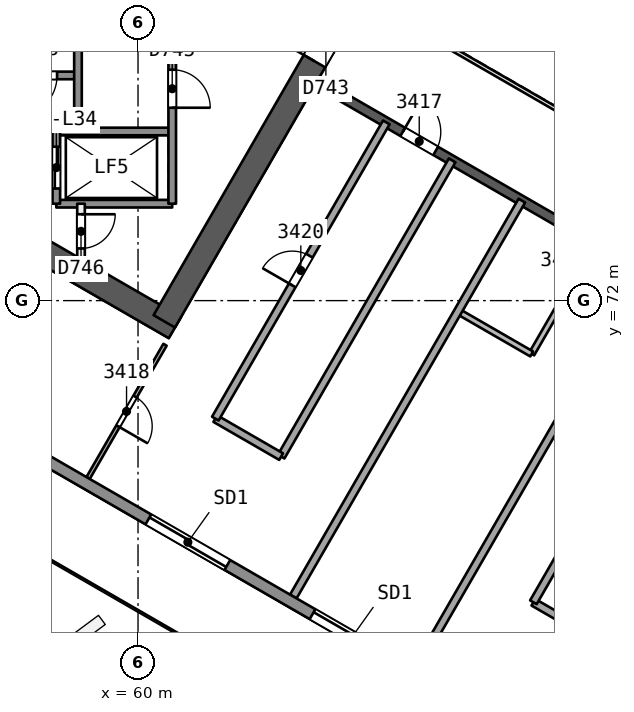
"""IFC4 building model, lengths in metres.
Left out: names, types, materials, properties, quantities, classifications, styles, units other than length and angle.
Written with IfcOpenShell. Run it as: python <this file> out.ifc"""

import sys

from ifc_helpers import new_model, si_unit, direction, frame, frame_2d, origin, place, context, subcontext, project, spatial, rectangle, extrude, element, fill, save


model = new_model("IFC4")
c1 = context("Model", 3, precision=1e-05, world=origin(), true_north=direction((0.0, 1.0)))
c2 = subcontext(c1, "Body", "Model", "MODEL_VIEW")
j1 = project(units=[si_unit("LENGTHUNIT", "METRE"), si_unit("PLANEANGLEUNIT", "RADIAN")], contexts=[c1])
p1 = place(None, origin())
s1 = spatial("IfcSite", under=j1, at=p1, CompositionType="ELEMENT")
p2 = place(p1, origin())
s2 = spatial("IfcBuilding", under=s1, at=p2, CompositionType="ELEMENT")
p3 = place(p2, frame((0.0, 0.0, 140.1)))
s3 = spatial("IfcBuildingStorey", under=s2, at=p3, CompositionType="ELEMENT", Elevation=140.1)
p4 = place(p3, frame((48.722, 78.365, 0.0), z_axis=(0.0, 0.0, 1.0), x_axis=(0.866020036431, -0.500009296414, 0.0)))
e1 = element("IfcWall", 1, at=p4, inside=s3, PredefinedType="SHEAR", context=c2, shape_type="SweptSolid", body=[
    extrude(rectangle(XDim=14.146, YDim=0.65, at=frame_2d((7.073, 0.0))), origin(), (0.0, 0.0, 1.0), 3.7),
])
p5 = place(p3, frame((60.691, 71.455, 0.0), z_axis=(0.0, 0.0, 1.0), x_axis=(0.499983075189, 0.866035175108, 0.0)))
e2 = element("IfcWall", 2, at=p5, inside=s3, PredefinedType="SHEAR", context=c2, shape_type="SweptSolid", body=[
    extrude(rectangle(XDim=10.055, YDim=0.65, at=frame_2d((5.027, 0.0))), origin(), (0.0, 0.0, 1.0), 3.7),
])
p6 = place(p5, frame((7.905, 0.0, 0.0)))
e3 = element("IfcOpeningElement", 3, at=p6, cuts=e2, PredefinedType="OPENING", context=c2, shape_type="SweptSolid", body=[
    extrude(rectangle(XDim=1.2, YDim=2.1, at=frame_2d((0.6, 1.05))), frame((0.0, 0.335, 0.0), z_axis=(0.0, -1.0, 0.0), x_axis=(1.0, 0.0, 0.0)), (0.0, 0.0, 1.0), 0.671),
])
p7 = place(p3, frame((64.7, 77.748, 0.0), z_axis=(0.0, 0.0, 1.0), x_axis=(0.866026492143, -0.499998114903, 0.0)))
e4 = element("IfcWall", 4, at=p7, inside=s3, PredefinedType="SHEAR", context=c2, shape_type="SweptSolid", body=[
    extrude(rectangle(XDim=15.588, YDim=0.25, at=frame_2d((7.794, 0.0))), origin(), (0.0, 0.0, 1.0), 3.25),
])
p8 = place(p7, frame((2.618, 0.0, 0.0)))
e5 = element("IfcOpeningElement", 5, at=p8, cuts=e4, PredefinedType="OPENING", context=c2, shape_type="SweptSolid", body=[
    extrude(rectangle(XDim=1.0, YDim=2.1, at=frame_2d((0.5, 1.05))), frame((0.0, 0.135, 0.0), z_axis=(0.0, -1.0, 0.0), x_axis=(1.0, 0.0, 0.0)), (0.0, 0.0, 1.0), 0.271),
])
p9 = place(p7, frame((8.727, 0.0, 0.0)))
e6 = element("IfcOpeningElement", 6, at=p9, cuts=e4, PredefinedType="OPENING", context=c2, shape_type="SweptSolid", body=[
    extrude(rectangle(XDim=1.0, YDim=2.1, at=frame_2d((0.5, 1.05))), frame((0.0, 0.135, 0.0), z_axis=(0.0, -1.0, 0.0), x_axis=(1.0, 0.0, 0.0)), (0.0, 0.0, 1.0), 0.271),
])
p10 = place(p7, frame((12.282, 0.0, 0.0)))
e7 = element("IfcOpeningElement", 7, at=p10, cuts=e4, PredefinedType="OPENING", context=c2, shape_type="SweptSolid", body=[
    extrude(rectangle(XDim=1.0, YDim=2.1, at=frame_2d((0.5, 1.05))), frame((0.0, 0.135, 0.0), z_axis=(0.0, -1.0, 0.0), x_axis=(1.0, 0.0, 0.0)), (0.0, 0.0, 1.0), 0.271),
])
p11 = place(p3, frame((60.71, 70.838, 0.0), z_axis=(0.0, 0.0, 1.0), x_axis=(-0.499997320042, -0.866026951053, 0.0)))
e8 = element("IfcWall", 8, at=p11, inside=s3, PredefinedType="PARTITIONING", context=c2, shape_type="SweptSolid", body=[
    extrude(rectangle(XDim=4.049, YDim=0.1, at=frame_2d((2.025, 0.0))), origin(), (0.0, 0.0, 1.0), 3.25),
])
p12 = place(p11, frame((1.575, 0.0, 0.0)))
e9 = element("IfcOpeningElement", 9, at=p12, cuts=e8, PredefinedType="OPENING", context=c2, shape_type="SweptSolid", body=[
    extrude(rectangle(XDim=0.9, YDim=2.1, at=frame_2d((0.45, 1.05))), frame((0.0, 0.061, 0.0), z_axis=(0.0, -1.0, 0.0), x_axis=(1.0, 0.0, 0.0)), (0.0, 0.0, 1.0), 0.121),
])
p13 = place(p3, frame((68.266, 75.689, 0.0), z_axis=(0.0, 0.0, 1.0), x_axis=(-0.5000018851, -0.866024315419, 0.0)))
e10 = element("IfcWall", 10, at=p13, inside=s3, PredefinedType="PARTITIONING", context=c2, shape_type="SweptSolid", body=[
    extrude(rectangle(XDim=9.0, YDim=0.2, at=frame_2d((4.5, 0.0))), origin(), (0.0, 0.0, 1.0), 3.25),
])
p14 = place(p3, frame((63.766, 67.895, 0.0), z_axis=(0.0, 0.0, 1.0), x_axis=(-0.866041268327, 0.499972520799, 0.0)))
e11 = element("IfcWall", 11, at=p14, inside=s3, PredefinedType="PARTITIONING", context=c2, shape_type="SweptSolid", body=[
    extrude(rectangle(XDim=2.0, YDim=0.2, at=frame_2d((1.0, 0.0))), origin(), (0.0, 0.0, 1.0), 3.25),
])
p15 = place(p3, frame((62.034, 68.895, 0.0), z_axis=(0.0, 0.0, 1.0), x_axis=(0.5000018851, 0.866024315419, 0.0)))
e12 = element("IfcWall", 12, at=p15, inside=s3, PredefinedType="PARTITIONING", context=c2, shape_type="SweptSolid", body=[
    extrude(rectangle(XDim=9.0, YDim=0.2, at=frame_2d((4.5, 0.0))), origin(), (0.0, 0.0, 1.0), 3.25),
])
p16 = place(p15, frame((4.05, 0.0, 0.0)))
e13 = element("IfcOpeningElement", 13, at=p16, cuts=e12, PredefinedType="OPENING", context=c2, shape_type="SweptSolid", body=[
    extrude(rectangle(XDim=0.9, YDim=2.1, at=frame_2d((0.45, 1.05))), frame((0.0, 0.11, 0.0), z_axis=(0.0, -1.0, 0.0), x_axis=(1.0, 0.0, 0.0)), (0.0, 0.0, 1.0), 0.221),
])
p17 = place(p3, frame((64.086, 64.214, 0.0), z_axis=(0.0, 0.0, 1.0), x_axis=(0.500002984678, 0.866023680573, 0.0)))
e14 = element("IfcWall", 14, at=p17, inside=s3, PredefinedType="PARTITIONING", context=c2, shape_type="SweptSolid", body=[
    extrude(rectangle(XDim=12.028, YDim=0.2, at=frame_2d((6.014, 0.0))), origin(), (0.0, 0.0, 1.0), 3.25),
])
p18 = place(p3, frame((72.041, 73.51, 0.0), z_axis=(0.0, 0.0, 1.0), x_axis=(-0.499994660107, -0.866028486751, 0.0)))
e15 = element("IfcWall", 15, at=p18, inside=s3, PredefinedType="PARTITIONING", context=c2, shape_type="SweptSolid", body=[
    extrude(rectangle(XDim=3.364, YDim=0.15, at=frame_2d((1.682, 0.0))), origin(), (0.0, 0.0, 1.0), 3.25),
])
p19 = place(p18, frame((1.282, 0.0, 0.0)))
e16 = element("IfcOpeningElement", 16, at=p19, cuts=e15, PredefinedType="OPENING", context=c2, shape_type="SweptSolid", body=[
    extrude(rectangle(XDim=0.8, YDim=2.1, at=frame_2d((0.4, 1.05))), frame((0.0, 0.085, 0.0), z_axis=(0.0, -1.0, 0.0), x_axis=(1.0, 0.0, 0.0)), (0.0, 0.0, 1.0), 0.171),
])
p20 = place(p3, frame((70.359, 70.596, 0.0), z_axis=(0.0, 0.0, 1.0), x_axis=(-0.866022320763, 0.500005339912, 0.0)))
e17 = element("IfcWall", 17, at=p20, inside=s3, PredefinedType="PARTITIONING", context=c2, shape_type="SweptSolid", body=[
    extrude(rectangle(XDim=2.241, YDim=0.15, at=frame_2d((1.121, 0.0))), origin(), (0.0, 0.0, 1.0), 3.25),
])
p21 = place(p3, frame((67.326, 62.343, 0.0), z_axis=(0.0, 0.0, 1.0), x_axis=(0.500002984678, 0.866023680573, 0.0)))
e18 = element("IfcWall", 18, at=p21, inside=s3, PredefinedType="PARTITIONING", context=c2, shape_type="SweptSolid", body=[
    extrude(rectangle(XDim=12.028, YDim=0.2, at=frame_2d((6.014, 0.0))), origin(), (0.0, 0.0, 1.0), 3.25),
])
p22 = place(p3, frame((72.136, 63.063, 0.0), z_axis=(0.0, 0.0, 1.0), x_axis=(-0.866010750942, 0.50002537861, 0.0)))
e19 = element("IfcWall", 19, at=p22, inside=s3, PredefinedType="PARTITIONING", context=c2, shape_type="SweptSolid", body=[
    extrude(rectangle(XDim=2.0, YDim=0.2, at=frame_2d((1.0, 0.0))), origin(), (0.0, 0.0, 1.0), 3.25),
])
p23 = place(p3, frame((70.404, 64.063, 0.0), z_axis=(0.0, 0.0, 1.0), x_axis=(0.499990139034, 0.866031096941, 0.0)))
e20 = element("IfcWall", 20, at=p23, inside=s3, PredefinedType="PARTITIONING", context=c2, shape_type="SweptSolid", body=[
    extrude(rectangle(XDim=9.0, YDim=0.2, at=frame_2d((4.5, 0.0))), origin(), (0.0, 0.0, 1.0), 3.25),
])
p24 = place(p23, frame((4.05, 0.0, 0.0)))
e21 = element("IfcOpeningElement", 21, at=p24, cuts=e20, PredefinedType="OPENING", context=c2, shape_type="SweptSolid", body=[
    extrude(rectangle(XDim=0.9, YDim=2.1, at=frame_2d((0.45, 1.05))), frame((0.0, 0.11, 0.0), z_axis=(0.0, -1.0, 0.0), x_axis=(1.0, 0.0, 0.0)), (0.0, 0.0, 1.0), 0.221),
])
p25 = place(p3, frame((89.365, 49.447, 0.0), z_axis=(0.0, 0.0, 1.0), x_axis=(-0.866024602029, 0.500001388679, 0.0)))
e22 = element("IfcWall", 22, at=p25, inside=s3, PredefinedType="SOLIDWALL", context=c2, shape_type="SweptSolid", body=[
    extrude(rectangle(XDim=55.434, YDim=0.3, at=frame_2d((27.717, 0.0))), origin(), (0.0, 0.0, 1.0), 3.25),
])
p26 = place(p25, frame((31.194, 0.0, 0.0)))
e23 = element("IfcOpeningElement", 23, at=p26, cuts=e22, PredefinedType="OPENING", context=c2, shape_type="SweptSolid", body=[
    extrude(rectangle(XDim=2.4, YDim=2.4, at=frame_2d((1.2, 1.2))), frame((0.0, 0.161, 0.0), z_axis=(0.0, -1.0, 0.0), x_axis=(1.0, 0.0, 0.0)), (0.0, 0.0, 1.0), 0.321),
])
p27 = place(p25, frame((43.056, 0.0, 0.0)))
e24 = element("IfcOpeningElement", 24, at=p27, cuts=e22, PredefinedType="OPENING", context=c2, shape_type="SweptSolid", body=[
    extrude(rectangle(XDim=2.4, YDim=2.4, at=frame_2d((1.2, 1.2))), frame((0.0, 0.161, 0.0), z_axis=(0.0, -1.0, 0.0), x_axis=(1.0, 0.0, 0.0)), (0.0, 0.0, 1.0), 0.321),
])
p28 = place(p25, frame((21.529, 0.0, 0.0)))
e25 = element("IfcOpeningElement", 25, at=p28, cuts=e22, PredefinedType="OPENING", context=c2, shape_type="SweptSolid", body=[
    extrude(rectangle(XDim=2.4, YDim=2.4, at=frame_2d((1.2, 1.2))), frame((0.0, 0.161, 0.0), z_axis=(0.0, -1.0, 0.0), x_axis=(1.0, 0.0, 0.0)), (0.0, 0.0, 1.0), 0.321),
])
p29 = place(p25, frame((10.014, 0.0, 0.0)))
e26 = element("IfcOpeningElement", 26, at=p29, cuts=e22, PredefinedType="OPENING", context=c2, shape_type="SweptSolid", body=[
    extrude(rectangle(XDim=2.4, YDim=2.4, at=frame_2d((1.2, 1.2))), frame((0.0, 0.161, 0.0), z_axis=(0.0, -1.0, 0.0), x_axis=(1.0, 0.0, 0.0)), (0.0, 0.0, 1.0), 0.321),
])
p30 = place(p25, frame((26.205, 0.0, 0.0)))
e27 = element("IfcOpeningElement", 27, at=p30, cuts=e22, PredefinedType="OPENING", context=c2, shape_type="SweptSolid", body=[
    extrude(rectangle(XDim=2.4, YDim=2.4, at=frame_2d((1.2, 1.2))), frame((0.0, 0.161, 0.0), z_axis=(0.0, -1.0, 0.0), x_axis=(1.0, 0.0, 0.0)), (0.0, 0.0, 1.0), 0.321),
])
p31 = place(p3, frame((58.42, 77.925, 0.0), z_axis=(0.0, 0.0, 1.0), x_axis=(-1.0, 0.0, 0.0)))
e28 = element("IfcWall", 28, at=p31, inside=s3, PredefinedType="SOLIDWALL", context=c2, shape_type="SweptSolid", body=[
    extrude(rectangle(XDim=7.7, YDim=0.2, at=frame_2d((3.85, 0.0))), origin(), (0.0, 0.0, 1.0), 3.25),
])
p32 = place(p31, frame((0.55, 0.0, 0.0)))
e29 = element("IfcOpeningElement", 29, at=p32, cuts=e28, PredefinedType="OPENING", context=c2, shape_type="SweptSolid", body=[
    extrude(rectangle(XDim=1.1, YDim=2.1, at=frame_2d((0.55, 1.05))), frame((0.0, 0.11, 0.0), z_axis=(0.0, -1.0, 0.0), x_axis=(1.0, 0.0, 0.0)), (0.0, 0.0, 1.0), 0.221),
])
for number, where, z_axis, x_axis in (
    (30, (60.9, 76.45, 0.0), (0.0, 0.0, 1.0), (-1.0, 0.0, 0.0)),
    (31, (60.9, 74.55, 0.0), (0.0, 0.0, 1.0), (-1.0, 0.0, 0.0)),
):
    element("IfcWall", number, at=place(p3, frame(where, z_axis=z_axis, x_axis=x_axis)), inside=s3, PredefinedType="SOLIDWALL", context=c2, shape_type="SweptSolid", body=[
        extrude(rectangle(XDim=3.05, YDim=0.2, at=frame_2d((1.525, 0.0))), origin(), (0.0, 0.0, 1.0), 3.25),
    ])
p33 = place(p3, frame((60.9, 85.45, 0.0), z_axis=(0.0, 0.0, 1.0), x_axis=(0.0, -1.0, 0.0)))
e32 = element("IfcWall", 32, at=p33, inside=s3, PredefinedType="SOLIDWALL", context=c2, shape_type="SweptSolid", body=[
    extrude(rectangle(XDim=10.9, YDim=0.2, at=frame_2d((5.45, 0.0))), origin(), (0.0, 0.0, 1.0), 3.25),
])
p34 = place(p33, frame((2.875, 0.0, 0.0)))
e33 = element("IfcOpeningElement", 33, at=p34, cuts=e32, PredefinedType="OPENING", context=c2, shape_type="SweptSolid", body=[
    extrude(rectangle(XDim=1.0, YDim=2.1, at=frame_2d((0.5, 1.05))), frame((0.0, 0.11, 0.0), z_axis=(0.0, -1.0, 0.0), x_axis=(1.0, 0.0, 0.0)), (0.0, 0.0, 1.0), 0.221),
])
p35 = place(p33, frame((7.375, 0.0, 0.0)))
e34 = element("IfcOpeningElement", 34, at=p35, cuts=e32, PredefinedType="OPENING", context=c2, shape_type="SweptSolid", body=[
    extrude(rectangle(XDim=1.0, YDim=2.1, at=frame_2d((0.5, 1.05))), frame((0.0, 0.11, 0.0), z_axis=(0.0, -1.0, 0.0), x_axis=(1.0, 0.0, 0.0)), (0.0, 0.0, 1.0), 0.221),
])
p36 = place(p3, frame((58.5, 74.55, 0.0), z_axis=(0.0, 0.0, 1.0), x_axis=(0.0, -1.0, 0.0)))
e35 = element("IfcWall", 35, at=p36, inside=s3, PredefinedType="PARTITIONING", context=c2, shape_type="SweptSolid", body=[
    extrude(rectangle(XDim=1.455, YDim=0.2, at=frame_2d((0.728, 0.0))), origin(), (0.0, 0.0, 1.0), 3.25),
])
p37 = place(p36, frame((0.278, 0.0, 0.0)))
e36 = element("IfcOpeningElement", 36, at=p37, cuts=e35, PredefinedType="OPENING", context=c2, shape_type="SweptSolid", body=[
    extrude(rectangle(XDim=0.9, YDim=2.1, at=frame_2d((0.45, 1.05))), frame((0.0, 0.11, 0.0), z_axis=(0.0, -1.0, 0.0), x_axis=(1.0, 0.0, 0.0)), (0.0, 0.0, 1.0), 0.221),
])
p38 = place(p3, frame((58.42, 85.45, 0.0), z_axis=(0.0, 0.0, 1.0), x_axis=(0.0, -1.0, 0.0)))
e37 = element("IfcWall", 37, at=p38, inside=s3, PredefinedType="SOLIDWALL", context=c2, shape_type="SweptSolid", body=[
    extrude(rectangle(XDim=9.0, YDim=0.2, at=frame_2d((4.5, 0.0))), origin(), (0.0, 0.0, 1.0), 3.25),
])
p39 = place(p3, frame((57.85, 76.45, 0.0), z_axis=(0.0, 0.0, 1.0), x_axis=(0.0, -1.0, 0.0)))
e38 = element("IfcWall", 38, at=p39, inside=s3, PredefinedType="SOLIDWALL", context=c2, shape_type="SweptSolid", body=[
    extrude(rectangle(XDim=1.9, YDim=0.2, at=frame_2d((0.95, 0.0))), origin(), (0.0, 0.0, 1.0), 3.25),
])
p40 = place(p39, frame((0.4, 0.0, 0.0)))
e39 = element("IfcOpeningElement", 39, at=p40, cuts=e38, PredefinedType="OPENING", context=c2, shape_type="SweptSolid", body=[
    extrude(rectangle(XDim=1.1, YDim=2.1, at=frame_2d((0.55, 1.05))), frame((0.0, 0.11, 0.0), z_axis=(0.0, -1.0, 0.0), x_axis=(1.0, 0.0, 0.0)), (0.0, 0.0, 1.0), 0.221),
])
p41 = place(p3, frame((67.702, 78.948, 0.0), z_axis=(0.0, 0.0, 1.0), x_axis=(0.866026658274, -0.499997827154, 0.0)))
e40 = element("IfcWall", 40, at=p41, inside=s3, PredefinedType="PARTITIONING", context=c2, shape_type="SweptSolid", body=[
    extrude(rectangle(XDim=11.588, YDim=0.1, at=frame_2d((5.794, 0.0))), origin(), (0.0, 0.0, 1.0), 3.25),
])
p42 = place(p8, origin())
e41 = element("IfcDoor", 41, at=p42, inside=s3, OperationType="SINGLE_SWING_LEFT", PredefinedType="NOTDEFINED", context=c2, shape_type="SweptSolid", body=[
    extrude(rectangle(XDim=1.0, YDim=2.1, at=frame_2d((0.5, 1.05))), frame((0.0, 0.025, 0.0), z_axis=(0.0, -1.0, 0.0), x_axis=(1.0, 0.0, 0.0)), (0.0, 0.0, 1.0), 0.05),
])
fill(e5, e41)
p43 = place(p12, origin())
e42 = element("IfcDoor", 42, at=p43, inside=s3, OperationType="SINGLE_SWING_RIGHT", PredefinedType="NOTDEFINED", context=c2, shape_type="SweptSolid", body=[
    extrude(rectangle(XDim=0.9, YDim=2.1, at=frame_2d((0.45, 1.05))), frame((0.0, 0.025, 0.0), z_axis=(0.0, -1.0, 0.0), x_axis=(1.0, 0.0, 0.0)), (0.0, 0.0, 1.0), 0.05),
])
fill(e9, e42)
p44 = place(p16, origin())
e43 = element("IfcDoor", 43, at=p44, inside=s3, OperationType="SINGLE_SWING_LEFT", PredefinedType="NOTDEFINED", context=c2, shape_type="SweptSolid", body=[
    extrude(rectangle(XDim=0.9, YDim=2.1, at=frame_2d((0.45, 1.05))), frame((0.0, 0.025, 0.0), z_axis=(0.0, -1.0, 0.0), x_axis=(1.0, 0.0, 0.0)), (0.0, 0.0, 1.0), 0.05),
])
fill(e13, e43)
p45 = place(p26, origin())
e44 = element("IfcDoor", 44, at=p45, inside=s3, OperationType="SLIDING_TO_LEFT", PredefinedType="NOTDEFINED", context=c2, shape_type="SweptSolid", body=[
    extrude(rectangle(XDim=2.4, YDim=2.4, at=frame_2d((1.2, 1.2))), frame((0.0, 0.025, 0.0), z_axis=(0.0, -1.0, 0.0), x_axis=(1.0, 0.0, 0.0)), (0.0, 0.0, 1.0), 0.05),
])
fill(e23, e44)
p46 = place(p30, origin())
e45 = element("IfcDoor", 45, at=p46, inside=s3, OperationType="SLIDING_TO_LEFT", PredefinedType="NOTDEFINED", context=c2, shape_type="SweptSolid", body=[
    extrude(rectangle(XDim=2.4, YDim=2.4, at=frame_2d((1.2, 1.2))), frame((0.0, 0.025, 0.0), z_axis=(0.0, -1.0, 0.0), x_axis=(1.0, 0.0, 0.0)), (0.0, 0.0, 1.0), 0.05),
])
fill(e27, e45)
p47 = place(p6, origin())
e46 = element("IfcDoor", 46, at=p47, inside=s3, OperationType="SINGLE_SWING_LEFT", PredefinedType="NOTDEFINED", context=c2, shape_type="SweptSolid", body=[
    extrude(rectangle(XDim=1.2, YDim=2.1, at=frame_2d((0.6, 1.05))), frame((0.0, 0.025, 0.0), z_axis=(0.0, -1.0, 0.0), x_axis=(1.0, 0.0, 0.0)), (0.0, 0.0, 1.0), 0.05),
])
fill(e3, e46)
p48 = place(p40, origin())
e47 = element("IfcDoor", 47, at=p48, inside=s3, OperationType="SLIDING_TO_RIGHT", PredefinedType="NOTDEFINED", context=c2, shape_type="SweptSolid", body=[
    extrude(rectangle(XDim=1.1, YDim=2.1, at=frame_2d((0.55, 1.05))), frame((0.0, 0.025, 0.0), z_axis=(0.0, -1.0, 0.0), x_axis=(1.0, 0.0, 0.0)), (0.0, 0.0, 1.0), 0.05),
])
fill(e39, e47)
p49 = place(p35, origin())
e48 = element("IfcDoor", 48, at=p49, inside=s3, OperationType="SINGLE_SWING_RIGHT", PredefinedType="NOTDEFINED", context=c2, shape_type="SweptSolid", body=[
    extrude(rectangle(XDim=1.0, YDim=2.1, at=frame_2d((0.5, 1.05))), frame((0.0, 0.025, 0.0), z_axis=(0.0, -1.0, 0.0), x_axis=(1.0, 0.0, 0.0)), (0.0, 0.0, 1.0), 0.05),
])
fill(e34, e48)
p50 = place(p37, origin())
e49 = element("IfcDoor", 49, at=p50, inside=s3, OperationType="SINGLE_SWING_LEFT", PredefinedType="NOTDEFINED", context=c2, shape_type="SweptSolid", body=[
    extrude(rectangle(XDim=0.9, YDim=2.1, at=frame_2d((0.45, 1.05))), frame((0.0, 0.025, 0.0), z_axis=(0.0, -1.0, 0.0), x_axis=(1.0, 0.0, 0.0)), (0.0, 0.0, 1.0), 0.05),
])
fill(e36, e49)
p51 = place(p32, origin())
e50 = element("IfcDoor", 50, at=p51, inside=s3, OperationType="SINGLE_SWING_RIGHT", PredefinedType="NOTDEFINED", context=c2, shape_type="SweptSolid", body=[
    extrude(rectangle(XDim=1.1, YDim=2.1, at=frame_2d((0.55, 1.05))), frame((0.0, 0.025, 0.0), z_axis=(0.0, -1.0, 0.0), x_axis=(1.0, 0.0, 0.0)), (0.0, 0.0, 1.0), 0.05),
])
fill(e29, e50)
save(model, sys.argv[1])
